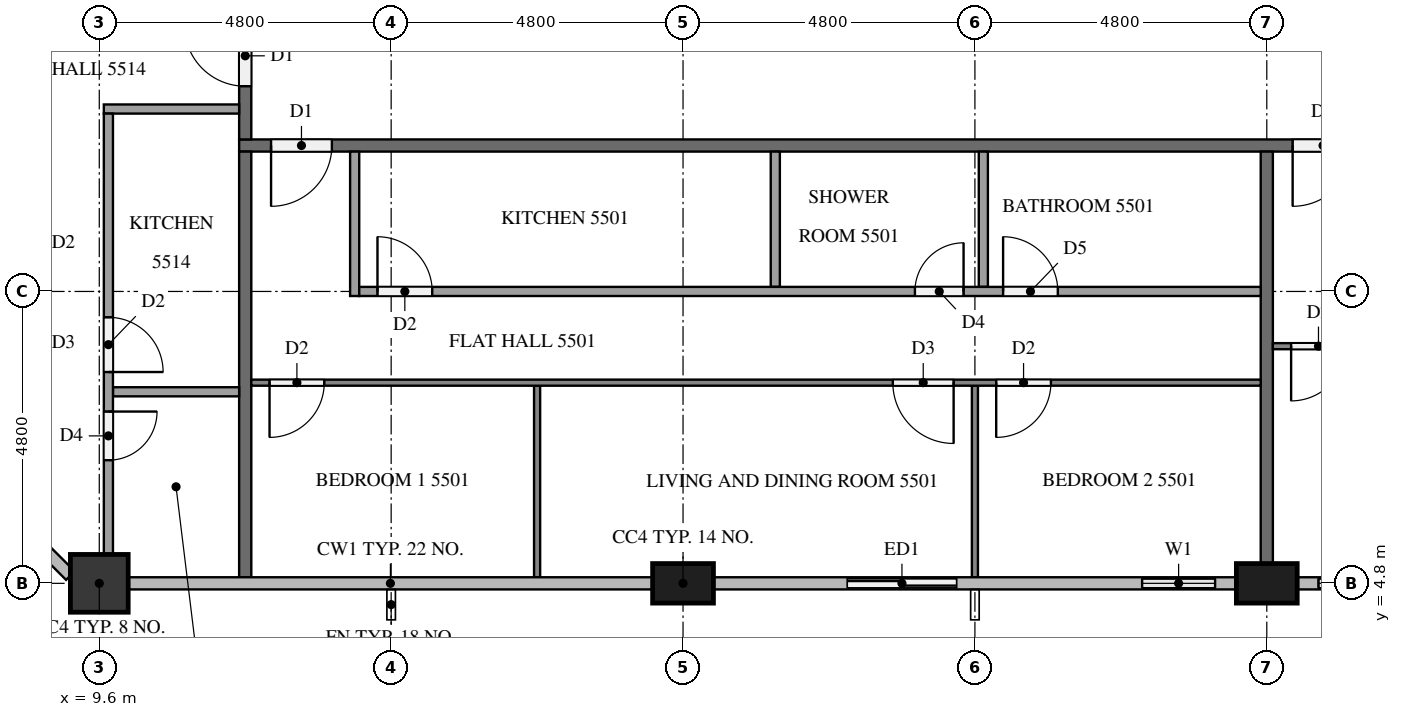
"""IFC4 building model, lengths in metres.
Left out: names, types, materials, properties, quantities, classifications, styles, units other than length and angle.
Written with IfcOpenShell. Run it as: python <this file> out.ifc"""

import sys

from ifc_helpers import new_model, si_unit, direction, frame, frame_2d, origin, origin_2d, place, context, subcontext, project, spatial, rectangle, extrude, element, fill, save


model = new_model("IFC4")
c1 = context("Model", 3, precision=1e-05, world=origin(), true_north=direction((0.0, 1.0)))
c2 = subcontext(c1, "Body", "Model", "MODEL_VIEW")
j1 = project(units=[si_unit("LENGTHUNIT", "METRE"), si_unit("PLANEANGLEUNIT", "RADIAN")], contexts=[c1])
p1 = place(None, origin())
s1 = spatial("IfcSite", under=j1, at=p1, CompositionType="ELEMENT")
p2 = place(p1, origin())
s2 = spatial("IfcBuilding", under=s1, at=p2, CompositionType="ELEMENT")
p3 = place(p2, frame((0.0, 0.0, 212.3)))
s3 = spatial("IfcBuildingStorey", under=s2, at=p3, CompositionType="ELEMENT", Elevation=212.3)
p4 = place(p3, frame((9.6, 4.8, 0.0), z_axis=(0.0, 0.0, 1.0), x_axis=(1.0, 0.0, 0.0)))
e1 = element("IfcColumn", 1, at=p4, inside=s3, PredefinedType="COLUMN", context=c2, shape_type="SweptSolid", body=[
    extrude(rectangle(XDim=0.95, YDim=0.95, at=origin_2d()), origin(), (0.0, 0.0, 1.0), 3.2),
])
for number, where, z_axis, x_axis in (
    (2, (19.2, 4.8, 0.0), (0.0, 0.0, 1.0), (1.0, 0.0, 0.0)),
    (3, (28.8, 4.8, 0.0), (0.0, 0.0, 1.0), (1.0, 0.0, 0.0)),
):
    element("IfcColumn", number, at=place(p3, frame(where, z_axis=z_axis, x_axis=x_axis)), inside=s3, PredefinedType="COLUMN", context=c2, shape_type="SweptSolid", body=[
        extrude(rectangle(XDim=1.0, YDim=0.65, at=origin_2d()), origin(), (0.0, 0.0, 1.0), 3.2),
    ])
p5 = place(p3, frame((21.6, 4.8, 0.0), z_axis=(0.0, 0.0, 1.0), x_axis=(1.0, 0.0, 0.0)))
e4 = element("IfcWall", 4, at=p5, inside=s3, PredefinedType="SOLIDWALL", context=c2, shape_type="SweptSolid", body=[
    extrude(rectangle(XDim=2.4, YDim=0.15, at=frame_2d((1.2, 0.0))), origin(), (0.0, 0.0, 1.0), 3.2),
])
p6 = place(p5, frame((0.3, 0.0, 0.0)))
e5 = element("IfcOpeningElement", 5, at=p6, cuts=e4, PredefinedType="OPENING", context=c2, shape_type="SweptSolid", body=[
    extrude(rectangle(XDim=1.8, YDim=2.4, at=frame_2d((0.9, 1.2))), frame((0.0, 0.085, 0.0), z_axis=(0.0, -1.0, 0.0), x_axis=(1.0, 0.0, 0.0)), (0.0, 0.0, 1.0), 0.17),
])
p7 = place(p3, frame((26.4, 4.8, 0.0), z_axis=(0.0, 0.0, 1.0), x_axis=(1.0, 0.0, 0.0)))
e6 = element("IfcWall", 6, at=p7, inside=s3, PredefinedType="SOLIDWALL", context=c2, shape_type="SweptSolid", body=[
    extrude(rectangle(XDim=1.9, YDim=0.15, at=frame_2d((0.95, 0.0))), origin(), (0.0, 0.0, 1.0), 3.2),
])
p8 = place(p7, frame((0.35, 0.0, 0.9)))
e7 = element("IfcOpeningElement", 7, at=p8, cuts=e6, PredefinedType="OPENING", context=c2, shape_type="SweptSolid", body=[
    extrude(rectangle(XDim=1.2, YDim=1.4, at=frame_2d((0.6, 0.7))), frame((0.0, 0.085, 0.0), z_axis=(0.0, -1.0, 0.0), x_axis=(1.0, 0.0, 0.0)), (0.0, 0.0, 1.0), 0.17),
])
p9 = place(p3, frame((29.3, 4.8, 0.0), z_axis=(0.0, 0.0, 1.0), x_axis=(1.0, 0.0, 0.0)))
e8 = element("IfcWall", 8, at=p9, inside=s3, PredefinedType="SOLIDWALL", context=c2, shape_type="SweptSolid", body=[
    extrude(rectangle(XDim=1.9, YDim=0.15, at=frame_2d((0.95, 0.0))), origin(), (0.0, 0.0, 1.0), 3.2),
])
p10 = place(p9, frame((0.35, 0.0, 0.9)))
e9 = element("IfcOpeningElement", 9, at=p10, cuts=e8, PredefinedType="OPENING", context=c2, shape_type="SweptSolid", body=[
    extrude(rectangle(XDim=1.2, YDim=1.4, at=frame_2d((0.6, 0.7))), frame((0.0, 0.085, 0.0), z_axis=(0.0, -1.0, 0.0), x_axis=(1.0, 0.0, 0.0)), (0.0, 0.0, 1.0), 0.17),
])
p11 = place(p3, frame((50.5, 12.0, 0.0), z_axis=(0.0, 0.0, 1.0), x_axis=(-1.0, 0.0, 0.0)))
e10 = element("IfcWall", 10, at=p11, inside=s3, PredefinedType="PARTITIONING", context=c2, shape_type="SweptSolid", body=[
    extrude(rectangle(XDim=38.6, YDim=0.2, at=frame_2d((19.3, 0.0))), origin(), (0.0, 0.0, 1.0), 3.2),
])
p12 = place(p11, frame((37.075, 0.0, 0.0)))
e11 = element("IfcOpeningElement", 11, at=p12, cuts=e10, PredefinedType="OPENING", context=c2, shape_type="SweptSolid", body=[
    extrude(rectangle(XDim=1.0, YDim=2.1, at=frame_2d((0.5, 1.05))), frame((0.0, 0.11, 0.0), z_axis=(0.0, -1.0, 0.0), x_axis=(1.0, 0.0, 0.0)), (0.0, 0.0, 1.0), 0.22),
])
p13 = place(p11, frame((20.275, 0.0, 0.0)))
e12 = element("IfcOpeningElement", 12, at=p13, cuts=e10, PredefinedType="OPENING", context=c2, shape_type="SweptSolid", body=[
    extrude(rectangle(XDim=1.0, YDim=2.1, at=frame_2d((0.5, 1.05))), frame((0.0, 0.11, 0.0), z_axis=(0.0, -1.0, 0.0), x_axis=(1.0, 0.0, 0.0)), (0.0, 0.0, 1.0), 0.22),
])
p14 = place(p11, frame((0.525, 0.0, 0.0)))
e13 = element("IfcOpeningElement", 13, at=p14, cuts=e10, PredefinedType="OPENING", context=c2, shape_type="SweptSolid", body=[
    extrude(rectangle(XDim=1.0, YDim=2.1, at=frame_2d((0.5, 1.05))), frame((0.0, 0.11, 0.0), z_axis=(0.0, -1.0, 0.0), x_axis=(1.0, 0.0, 0.0)), (0.0, 0.0, 1.0), 0.22),
])
p15 = place(p3, frame((12.0, 12.1, 0.0), z_axis=(0.0, 0.0, 1.0), x_axis=(0.0, 1.0, 0.0)))
e14 = element("IfcWall", 14, at=p15, inside=s3, PredefinedType="PARTITIONING", context=c2, shape_type="SweptSolid", body=[
    extrude(rectangle(XDim=28.6, YDim=0.2, at=frame_2d((14.3, 0.0))), origin(), (0.0, 0.0, 1.0), 3.2),
])
p16 = place(p15, frame((27.275, 0.0, 0.0)))
e15 = element("IfcOpeningElement", 15, at=p16, cuts=e14, PredefinedType="OPENING", context=c2, shape_type="SweptSolid", body=[
    extrude(rectangle(XDim=1.0, YDim=2.1, at=frame_2d((0.5, 1.05))), frame((0.0, 0.11, 0.0), z_axis=(0.0, -1.0, 0.0), x_axis=(1.0, 0.0, 0.0)), (0.0, 0.0, 1.0), 0.22),
])
p17 = place(p15, frame((12.325, 0.0, 0.0)))
e16 = element("IfcOpeningElement", 16, at=p17, cuts=e14, PredefinedType="OPENING", context=c2, shape_type="SweptSolid", body=[
    extrude(rectangle(XDim=1.0, YDim=2.1, at=frame_2d((0.5, 1.05))), frame((0.0, 0.11, 0.0), z_axis=(0.0, -1.0, 0.0), x_axis=(1.0, 0.0, 0.0)), (0.0, 0.0, 1.0), 0.22),
])
p18 = place(p15, frame((2.725, 0.0, 0.0)))
e17 = element("IfcOpeningElement", 17, at=p18, cuts=e14, PredefinedType="OPENING", context=c2, shape_type="SweptSolid", body=[
    extrude(rectangle(XDim=1.0, YDim=2.1, at=frame_2d((0.5, 1.05))), frame((0.0, 0.11, 0.0), z_axis=(0.0, -1.0, 0.0), x_axis=(1.0, 0.0, 0.0)), (0.0, 0.0, 1.0), 0.22),
])
p19 = place(p15, frame((0.875, 0.0, 0.0)))
e18 = element("IfcOpeningElement", 18, at=p19, cuts=e14, PredefinedType="OPENING", context=c2, shape_type="SweptSolid", body=[
    extrude(rectangle(XDim=1.0, YDim=2.1, at=frame_2d((0.5, 1.05))), frame((0.0, 0.11, 0.0), z_axis=(0.0, -1.0, 0.0), x_axis=(1.0, 0.0, 0.0)), (0.0, 0.0, 1.0), 0.22),
])
p20 = place(p3, frame((28.8, 11.9, 0.0), z_axis=(0.0, 0.0, 1.0), x_axis=(0.0, -1.0, 0.0)))
e19 = element("IfcWall", 19, at=p20, inside=s3, PredefinedType="PARTITIONING", context=c2, shape_type="SweptSolid", body=[
    extrude(rectangle(XDim=6.775, YDim=0.2, at=frame_2d((3.387, 0.0))), origin(), (0.0, 0.0, 1.0), 3.2),
])
p21 = place(p3, frame((12.0, 4.9, 0.0), z_axis=(0.0, 0.0, 1.0), x_axis=(0.0, 1.0, 0.0)))
e20 = element("IfcWall", 20, at=p21, inside=s3, PredefinedType="PARTITIONING", context=c2, shape_type="SweptSolid", body=[
    extrude(rectangle(XDim=7.0, YDim=0.2, at=frame_2d((3.5, 0.0))), origin(), (0.0, 0.0, 1.0), 3.2),
])
for number, where, z_axis, x_axis in (
    (21, (16.8, 8.05, 0.0), (0.0, 0.0, 1.0), (0.0, -1.0, 0.0)),
    (22, (24.0, 8.05, 0.0), (0.0, 0.0, 1.0), (0.0, -1.0, 0.0)),
):
    element("IfcWall", number, at=place(p3, frame(where, z_axis=z_axis, x_axis=x_axis)), inside=s3, PredefinedType="PARTITIONING", context=c2, shape_type="SweptSolid", body=[
        extrude(rectangle(XDim=3.15, YDim=0.1, at=frame_2d((1.575, 0.0))), origin(), (0.0, 0.0, 1.0), 3.2),
    ])
p22 = place(p3, frame((28.7, 8.1, 0.0), z_axis=(0.0, 0.0, 1.0), x_axis=(-1.0, 0.0, 0.0)))
e23 = element("IfcWall", 23, at=p22, inside=s3, PredefinedType="PARTITIONING", context=c2, shape_type="SweptSolid", body=[
    extrude(rectangle(XDim=16.6, YDim=0.1, at=frame_2d((8.3, 0.0))), origin(), (0.0, 0.0, 1.0), 3.2),
])
p23 = place(p22, frame((15.4, 0.0, 0.0)))
e24 = element("IfcOpeningElement", 24, at=p23, cuts=e23, PredefinedType="OPENING", context=c2, shape_type="SweptSolid", body=[
    extrude(rectangle(XDim=0.9, YDim=2.1, at=frame_2d((0.45, 1.05))), frame((0.0, 0.06, 0.0), z_axis=(0.0, -1.0, 0.0), x_axis=(1.0, 0.0, 0.0)), (0.0, 0.0, 1.0), 0.12),
])
p24 = place(p22, frame((5.05, 0.0, 0.0)))
e25 = element("IfcOpeningElement", 25, at=p24, cuts=e23, PredefinedType="OPENING", context=c2, shape_type="SweptSolid", body=[
    extrude(rectangle(XDim=1.0, YDim=2.1, at=frame_2d((0.5, 1.05))), frame((0.0, 0.06, 0.0), z_axis=(0.0, -1.0, 0.0), x_axis=(1.0, 0.0, 0.0)), (0.0, 0.0, 1.0), 0.12),
])
p25 = place(p22, frame((3.45, 0.0, 0.0)))
e26 = element("IfcOpeningElement", 26, at=p25, cuts=e23, PredefinedType="OPENING", context=c2, shape_type="SweptSolid", body=[
    extrude(rectangle(XDim=0.9, YDim=2.1, at=frame_2d((0.45, 1.05))), frame((0.0, 0.06, 0.0), z_axis=(0.0, -1.0, 0.0), x_axis=(1.0, 0.0, 0.0)), (0.0, 0.0, 1.0), 0.12),
])
for number, where, z_axis, x_axis in (
    (27, (20.717, 11.9, 0.0), (0.0, 0.0, 1.0), (0.0, -1.0, 0.0)),
    (28, (24.138, 11.9, 0.0), (0.0, 0.0, 1.0), (0.0, -1.0, 0.0)),
):
    element("IfcWall", number, at=place(p3, frame(where, z_axis=z_axis, x_axis=x_axis)), inside=s3, PredefinedType="PARTITIONING", context=c2, shape_type="SweptSolid", body=[
        extrude(rectangle(XDim=2.225, YDim=0.15, at=frame_2d((1.112, 0.0))), origin(), (0.0, 0.0, 1.0), 3.2),
    ])
p26 = place(p3, frame((13.8, 11.9, 0.0), z_axis=(0.0, 0.0, 1.0), x_axis=(0.0, -1.0, 0.0)))
e29 = element("IfcWall", 29, at=p26, inside=s3, PredefinedType="PARTITIONING", context=c2, shape_type="SweptSolid", body=[
    extrude(rectangle(XDim=2.375, YDim=0.15, at=frame_2d((1.188, 0.0))), origin(), (0.0, 0.0, 1.0), 3.2),
])
p27 = place(p3, frame((13.875, 9.6, 0.0), z_axis=(0.0, 0.0, 1.0), x_axis=(1.0, 0.0, 0.0)))
e30 = element("IfcWall", 30, at=p27, inside=s3, PredefinedType="PARTITIONING", context=c2, shape_type="SweptSolid", body=[
    extrude(rectangle(XDim=14.825, YDim=0.15, at=frame_2d((7.413, 0.0))), origin(), (0.0, 0.0, 1.0), 3.2),
])
p28 = place(p27, frame((0.3, 0.0, 0.0)))
e31 = element("IfcOpeningElement", 31, at=p28, cuts=e30, PredefinedType="OPENING", context=c2, shape_type="SweptSolid", body=[
    extrude(rectangle(XDim=0.9, YDim=2.1, at=frame_2d((0.45, 1.05))), frame((0.0, 0.085, 0.0), z_axis=(0.0, -1.0, 0.0), x_axis=(1.0, 0.0, 0.0)), (0.0, 0.0, 1.0), 0.17),
])
p29 = place(p27, frame((9.138, 0.0, 0.0)))
e32 = element("IfcOpeningElement", 32, at=p29, cuts=e30, PredefinedType="OPENING", context=c2, shape_type="SweptSolid", body=[
    extrude(rectangle(XDim=0.8, YDim=2.1, at=frame_2d((0.4, 1.05))), frame((0.0, 0.085, 0.0), z_axis=(0.0, -1.0, 0.0), x_axis=(1.0, 0.0, 0.0)), (0.0, 0.0, 1.0), 0.17),
])
p30 = place(p27, frame((10.588, 0.0, 0.0)))
e33 = element("IfcOpeningElement", 33, at=p30, cuts=e30, PredefinedType="OPENING", context=c2, shape_type="SweptSolid", body=[
    extrude(rectangle(XDim=0.9, YDim=2.1, at=frame_2d((0.45, 1.05))), frame((0.0, 0.085, 0.0), z_axis=(0.0, -1.0, 0.0), x_axis=(1.0, 0.0, 0.0)), (0.0, 0.0, 1.0), 0.17),
])
p31 = place(p3, frame((40.7, 8.7, 0.0), z_axis=(0.0, 0.0, 1.0), x_axis=(-1.0, 0.0, 0.0)))
e34 = element("IfcWall", 34, at=p31, inside=s3, PredefinedType="PARTITIONING", context=c2, shape_type="SweptSolid", body=[
    extrude(rectangle(XDim=11.8, YDim=0.1, at=frame_2d((5.9, 0.0))), origin(), (0.0, 0.0, 1.0), 3.2),
])
p32 = place(p31, frame((10.6, 0.0, 0.0)))
e35 = element("IfcOpeningElement", 35, at=p32, cuts=e34, PredefinedType="OPENING", context=c2, shape_type="SweptSolid", body=[
    extrude(rectangle(XDim=0.9, YDim=2.1, at=frame_2d((0.45, 1.05))), frame((0.0, 0.06, 0.0), z_axis=(0.0, -1.0, 0.0), x_axis=(1.0, 0.0, 0.0)), (0.0, 0.0, 1.0), 0.12),
])
p33 = place(p31, frame((0.3, 0.0, 0.0)))
e36 = element("IfcOpeningElement", 36, at=p33, cuts=e34, PredefinedType="OPENING", context=c2, shape_type="SweptSolid", body=[
    extrude(rectangle(XDim=1.0, YDim=2.1, at=frame_2d((0.5, 1.05))), frame((0.0, 0.06, 0.0), z_axis=(0.0, -1.0, 0.0), x_axis=(1.0, 0.0, 0.0)), (0.0, 0.0, 1.0), 0.12),
])
p34 = place(p3, frame((11.9, 7.95, 0.0), z_axis=(0.0, 0.0, 1.0), x_axis=(-1.0, 0.0, 0.0)))
e37 = element("IfcWall", 37, at=p34, inside=s3, PredefinedType="PARTITIONING", context=c2, shape_type="SweptSolid", body=[
    extrude(rectangle(XDim=2.075, YDim=0.15, at=frame_2d((1.038, 0.0))), origin(), (0.0, 0.0, 1.0), 3.2),
])
p35 = place(p3, frame((11.9, 12.6, 0.0), z_axis=(0.0, 0.0, 1.0), x_axis=(-1.0, 0.0, 0.0)))
e38 = element("IfcWall", 38, at=p35, inside=s3, PredefinedType="PARTITIONING", context=c2, shape_type="SweptSolid", body=[
    extrude(rectangle(XDim=2.225, YDim=0.15, at=frame_2d((1.112, 0.0))), origin(), (0.0, 0.0, 1.0), 3.2),
])
p36 = place(p3, frame((9.75, 12.525, 0.0), z_axis=(0.0, 0.0, 1.0), x_axis=(0.0, -1.0, 0.0)))
e39 = element("IfcWall", 39, at=p36, inside=s3, PredefinedType="PARTITIONING", context=c2, shape_type="SweptSolid", body=[
    extrude(rectangle(XDim=7.25, YDim=0.15, at=frame_2d((3.625, 0.0))), origin(), (0.0, 0.0, 1.0), 3.2),
])
p37 = place(p36, frame((3.35, 0.0, 0.0)))
e40 = element("IfcOpeningElement", 40, at=p37, cuts=e39, PredefinedType="OPENING", context=c2, shape_type="SweptSolid", body=[
    extrude(rectangle(XDim=0.9, YDim=2.1, at=frame_2d((0.45, 1.05))), frame((0.0, 0.085, 0.0), z_axis=(0.0, -1.0, 0.0), x_axis=(1.0, 0.0, 0.0)), (0.0, 0.0, 1.0), 0.17),
])
p38 = place(p36, frame((4.9, 0.0, 0.0)))
e41 = element("IfcOpeningElement", 41, at=p38, cuts=e39, PredefinedType="OPENING", context=c2, shape_type="SweptSolid", body=[
    extrude(rectangle(XDim=0.8, YDim=2.1, at=frame_2d((0.4, 1.05))), frame((0.0, 0.085, 0.0), z_axis=(0.0, -1.0, 0.0), x_axis=(1.0, 0.0, 0.0)), (0.0, 0.0, 1.0), 0.17),
])
p39 = place(p6, origin())
e42 = element("IfcDoor", 42, at=p39, inside=s3, OperationType="SLIDING_TO_LEFT", PredefinedType="DOOR", context=c2, shape_type="SweptSolid", body=[
    extrude(rectangle(XDim=1.8, YDim=2.4, at=frame_2d((0.9, 1.2))), frame((0.0, 0.025, 0.0), z_axis=(0.0, -1.0, 0.0), x_axis=(1.0, 0.0, 0.0)), (0.0, 0.0, 1.0), 0.05),
])
fill(e5, e42)
p40 = place(p8, origin())
e43 = element("IfcWindow", 43, at=p40, inside=s3, PartitioningType="SINGLE_PANEL", PredefinedType="WINDOW", context=c2, shape_type="SweptSolid", body=[
    extrude(rectangle(XDim=1.2, YDim=1.4, at=frame_2d((0.6, 0.7))), frame((0.0, 0.03, 0.0), z_axis=(0.0, -1.0, 0.0), x_axis=(1.0, 0.0, 0.0)), (0.0, 0.0, 1.0), 0.06),
])
fill(e7, e43)
p41 = place(p10, origin())
e44 = element("IfcWindow", 44, at=p41, inside=s3, PartitioningType="SINGLE_PANEL", PredefinedType="WINDOW", context=c2, shape_type="SweptSolid", body=[
    extrude(rectangle(XDim=1.2, YDim=1.4, at=frame_2d((0.6, 0.7))), frame((0.0, 0.03, 0.0), z_axis=(0.0, -1.0, 0.0), x_axis=(1.0, 0.0, 0.0)), (0.0, 0.0, 1.0), 0.06),
])
fill(e9, e44)
p42 = place(p12, origin())
e45 = element("IfcDoor", 45, at=p42, inside=s3, OperationType="SINGLE_SWING_RIGHT", PredefinedType="DOOR", context=c2, shape_type="SweptSolid", body=[
    extrude(rectangle(XDim=1.0, YDim=2.1, at=frame_2d((0.5, 1.05))), frame((0.0, 0.025, 0.0), z_axis=(0.0, -1.0, 0.0), x_axis=(1.0, 0.0, 0.0)), (0.0, 0.0, 1.0), 0.05),
])
fill(e11, e45)
p43 = place(p13, origin())
e46 = element("IfcDoor", 46, at=p43, inside=s3, OperationType="SINGLE_SWING_RIGHT", PredefinedType="DOOR", context=c2, shape_type="SweptSolid", body=[
    extrude(rectangle(XDim=1.0, YDim=2.1, at=frame_2d((0.5, 1.05))), frame((0.0, 0.025, 0.0), z_axis=(0.0, -1.0, 0.0), x_axis=(1.0, 0.0, 0.0)), (0.0, 0.0, 1.0), 0.05),
])
fill(e12, e46)
p44 = place(p19, origin())
e47 = element("IfcDoor", 47, at=p44, inside=s3, OperationType="SINGLE_SWING_RIGHT", PredefinedType="DOOR", context=c2, shape_type="SweptSolid", body=[
    extrude(rectangle(XDim=1.0, YDim=2.1, at=frame_2d((0.5, 1.05))), frame((0.0, 0.025, 0.0), z_axis=(0.0, -1.0, 0.0), x_axis=(1.0, 0.0, 0.0)), (0.0, 0.0, 1.0), 0.05),
])
fill(e18, e47)
p45 = place(p23, origin())
e48 = element("IfcDoor", 48, at=p45, inside=s3, OperationType="SINGLE_SWING_RIGHT", PredefinedType="DOOR", context=c2, shape_type="SweptSolid", body=[
    extrude(rectangle(XDim=0.9, YDim=2.1, at=frame_2d((0.45, 1.05))), frame((0.0, 0.025, 0.0), z_axis=(0.0, -1.0, 0.0), x_axis=(1.0, 0.0, 0.0)), (0.0, 0.0, 1.0), 0.05),
])
fill(e24, e48)
p46 = place(p24, origin())
e49 = element("IfcDoor", 49, at=p46, inside=s3, OperationType="SINGLE_SWING_LEFT", PredefinedType="DOOR", context=c2, shape_type="SweptSolid", body=[
    extrude(rectangle(XDim=1.0, YDim=2.1, at=frame_2d((0.5, 1.05))), frame((0.0, 0.025, 0.0), z_axis=(0.0, -1.0, 0.0), x_axis=(1.0, 0.0, 0.0)), (0.0, 0.0, 1.0), 0.05),
])
fill(e25, e49)
p47 = place(p25, origin())
e50 = element("IfcDoor", 50, at=p47, inside=s3, OperationType="SINGLE_SWING_RIGHT", PredefinedType="DOOR", context=c2, shape_type="SweptSolid", body=[
    extrude(rectangle(XDim=0.9, YDim=2.1, at=frame_2d((0.45, 1.05))), frame((0.0, 0.025, 0.0), z_axis=(0.0, -1.0, 0.0), x_axis=(1.0, 0.0, 0.0)), (0.0, 0.0, 1.0), 0.05),
])
fill(e26, e50)
p48 = place(p28, origin())
e51 = element("IfcDoor", 51, at=p48, inside=s3, OperationType="SINGLE_SWING_LEFT", PredefinedType="DOOR", context=c2, shape_type="SweptSolid", body=[
    extrude(rectangle(XDim=0.9, YDim=2.1, at=frame_2d((0.45, 1.05))), frame((0.0, 0.025, 0.0), z_axis=(0.0, -1.0, 0.0), x_axis=(1.0, 0.0, 0.0)), (0.0, 0.0, 1.0), 0.05),
])
fill(e31, e51)
p49 = place(p29, origin())
e52 = element("IfcDoor", 52, at=p49, inside=s3, OperationType="SINGLE_SWING_RIGHT", PredefinedType="DOOR", context=c2, shape_type="SweptSolid", body=[
    extrude(rectangle(XDim=0.8, YDim=2.1, at=frame_2d((0.4, 1.05))), frame((0.0, 0.025, 0.0), z_axis=(0.0, -1.0, 0.0), x_axis=(1.0, 0.0, 0.0)), (0.0, 0.0, 1.0), 0.05),
])
fill(e32, e52)
p50 = place(p30, origin())
e53 = element("IfcDoor", 53, at=p50, inside=s3, OperationType="SINGLE_SWING_LEFT", PredefinedType="DOOR", context=c2, shape_type="SweptSolid", body=[
    extrude(rectangle(XDim=0.9, YDim=2.1, at=frame_2d((0.45, 1.05))), frame((0.0, 0.025, 0.0), z_axis=(0.0, -1.0, 0.0), x_axis=(1.0, 0.0, 0.0)), (0.0, 0.0, 1.0), 0.05),
])
fill(e33, e53)
p51 = place(p32, origin())
e54 = element("IfcDoor", 54, at=p51, inside=s3, OperationType="SINGLE_SWING_RIGHT", PredefinedType="DOOR", context=c2, shape_type="SweptSolid", body=[
    extrude(rectangle(XDim=0.9, YDim=2.1, at=frame_2d((0.45, 1.05))), frame((0.0, 0.025, 0.0), z_axis=(0.0, -1.0, 0.0), x_axis=(1.0, 0.0, 0.0)), (0.0, 0.0, 1.0), 0.05),
])
fill(e35, e54)
p52 = place(p37, origin())
e55 = element("IfcDoor", 55, at=p52, inside=s3, OperationType="SINGLE_SWING_RIGHT", PredefinedType="DOOR", context=c2, shape_type="SweptSolid", body=[
    extrude(rectangle(XDim=0.9, YDim=2.1, at=frame_2d((0.45, 1.05))), frame((0.0, 0.025, 0.0), z_axis=(0.0, -1.0, 0.0), x_axis=(1.0, 0.0, 0.0)), (0.0, 0.0, 1.0), 0.05),
])
fill(e40, e55)
p53 = place(p38, origin())
e56 = element("IfcDoor", 56, at=p53, inside=s3, OperationType="SINGLE_SWING_LEFT", PredefinedType="DOOR", context=c2, shape_type="SweptSolid", body=[
    extrude(rectangle(XDim=0.8, YDim=2.1, at=frame_2d((0.4, 1.05))), frame((0.0, 0.025, 0.0), z_axis=(0.0, -1.0, 0.0), x_axis=(1.0, 0.0, 0.0)), (0.0, 0.0, 1.0), 0.05),
])
fill(e41, e56)
save(model, sys.argv[1])
